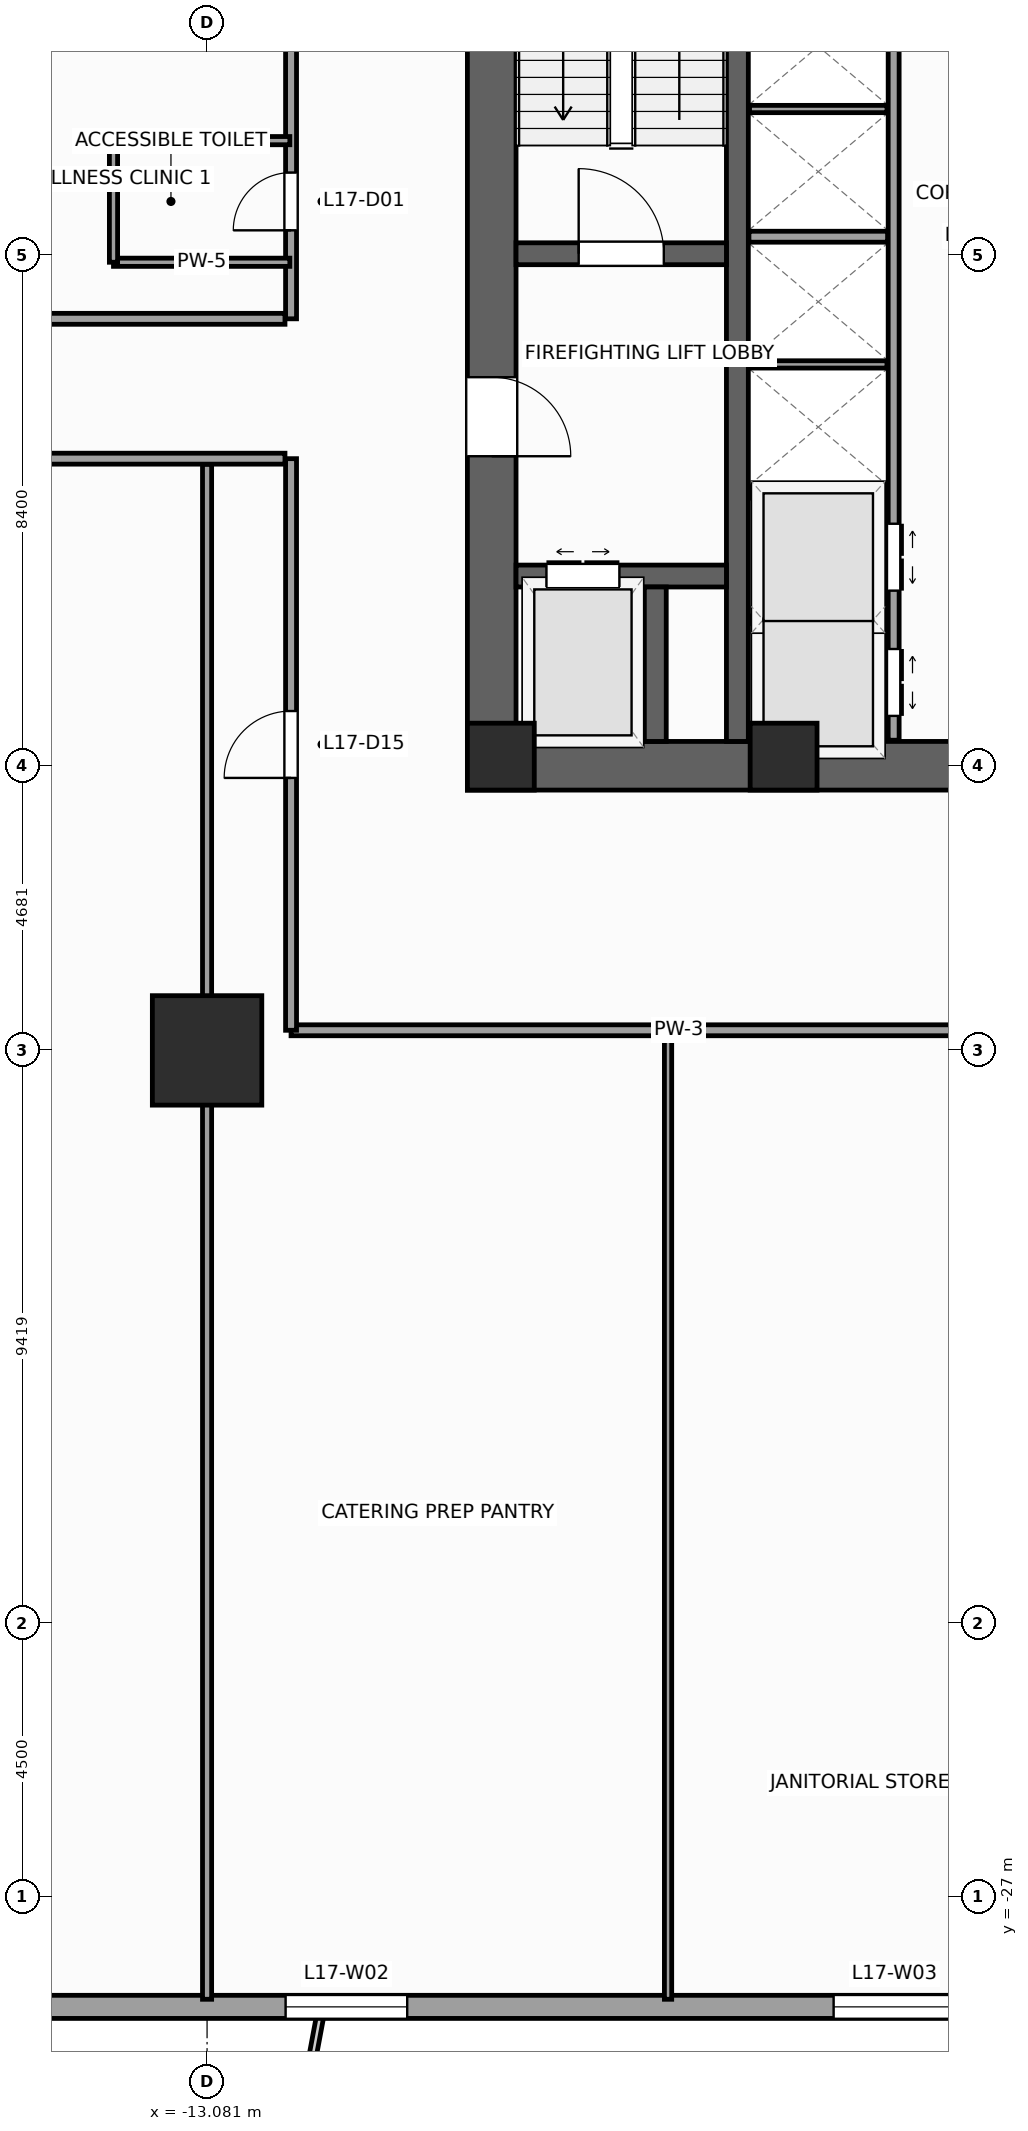
"""IFC4 building model, lengths in metres.
Left out: names, types, materials, properties, quantities, classifications, styles, units other than length and angle.
Written with IfcOpenShell. Run it as: python <this file> out.ifc"""

import sys

from ifc_helpers import new_model, si_unit, direction, frame, frame_2d, origin, origin_2d, place, context, subcontext, project, spatial, rectangle, extrude, source, transform, mapped, element, fill, save


model = new_model("IFC4")
c1 = context("Model", 3, precision=1e-05, world=origin(), true_north=direction((0.0, 1.0)))
c2 = subcontext(c1, "Body", "Model", "MODEL_VIEW")
j1 = project(units=[si_unit("LENGTHUNIT", "METRE"), si_unit("PLANEANGLEUNIT", "RADIAN")], contexts=[c1])
p1 = place(None, origin())
s1 = spatial("IfcSite", under=j1, at=p1, CompositionType="ELEMENT")
p2 = place(p1, origin())
s2 = spatial("IfcBuilding", under=s1, at=p2, CompositionType="ELEMENT")
p3 = place(p2, frame((0.0, 0.0, 74.0)))
s3 = spatial("IfcBuildingStorey", under=s2, at=p3, CompositionType="ELEMENT", Elevation=74.0)
p4 = place(p3, frame((-8.8, -8.4, 0.0), z_axis=(0.0, 0.0, 1.0), x_axis=(1.0, 0.0, 0.0)))
e1 = element("IfcWall", 1, at=p4, inside=s3, PredefinedType="SHEAR", context=c2, shape_type="SweptSolid", body=[
    extrude(rectangle(XDim=17.6, YDim=0.8, at=frame_2d((8.8, 0.0))), origin(), (0.0, 0.0, 1.0), 4.0),
])
p5 = place(p4, frame((8.15, 0.0, 0.0)))
e2 = element("IfcOpeningElement", 2, at=p5, cuts=e1, PredefinedType="OPENING", context=c2, shape_type="SweptSolid", body=[
    extrude(rectangle(XDim=1.3, YDim=2.2, at=frame_2d((0.65, 1.1))), frame((0.0, 0.41, 0.0), z_axis=(0.0, -1.0, 0.0), x_axis=(1.0, 0.0, 0.0)), (0.0, 0.0, 1.0), 0.82),
])
p6 = place(p3, frame((-8.4, -8.0, 0.0), z_axis=(0.0, 0.0, 1.0), x_axis=(0.0, 1.0, 0.0)))
e3 = element("IfcWall", 3, at=p6, inside=s3, PredefinedType="SHEAR", context=c2, shape_type="SweptSolid", body=[
    extrude(rectangle(XDim=16.0, YDim=0.8, at=frame_2d((8.0, 0.0))), origin(), (0.0, 0.0, 1.0), 4.0),
])
p7 = place(p6, frame((4.69, 0.0, 0.0)))
e4 = element("IfcOpeningElement", 4, at=p7, cuts=e3, PredefinedType="OPENING", context=c2, shape_type="SweptSolid", body=[
    extrude(rectangle(XDim=1.3, YDim=2.2, at=frame_2d((0.65, 1.1))), frame((0.0, 0.41, 0.0), z_axis=(0.0, -1.0, 0.0), x_axis=(1.0, 0.0, 0.0)), (0.0, 0.0, 1.0), 0.82),
])
p8 = place(p3, frame((-4.36, -8.0, 0.0), z_axis=(0.0, 0.0, 1.0), x_axis=(0.0, 1.0, 0.0)))
e5 = element("IfcWall", 5, at=p8, inside=s3, PredefinedType="SHEAR", context=c2, shape_type="SweptSolid", body=[
    extrude(rectangle(XDim=16.0, YDim=0.36, at=frame_2d((8.0, 0.0))), origin(), (0.0, 0.0, 1.0), 4.0),
])
p9 = place(p3, frame((-8.0, 0.02, 0.0), z_axis=(0.0, 0.0, 1.0), x_axis=(1.0, 0.0, 0.0)))
e6 = element("IfcWall", 6, at=p9, inside=s3, PredefinedType="SHEAR", context=c2, shape_type="SweptSolid", body=[
    extrude(rectangle(XDim=3.46, YDim=0.36, at=frame_2d((1.73, 0.0))), origin(), (0.0, 0.0, 1.0), 4.0),
])
p10 = place(p9, frame((1.03, 0.0, 0.0)))
e7 = element("IfcOpeningElement", 7, at=p10, cuts=e6, PredefinedType="OPENING", context=c2, shape_type="SweptSolid", body=[
    extrude(rectangle(XDim=1.4, YDim=2.2, at=frame_2d((0.7, 1.1))), frame((0.0, 0.19, 0.0), z_axis=(0.0, -1.0, 0.0), x_axis=(1.0, 0.0, 0.0)), (0.0, 0.0, 1.0), 0.38),
])
p11 = place(p3, frame((-8.0, -5.28, 0.0), z_axis=(0.0, 0.0, 1.0), x_axis=(1.0, 0.0, 0.0)))
e8 = element("IfcWall", 8, at=p11, inside=s3, PredefinedType="SHEAR", context=c2, shape_type="SweptSolid", body=[
    extrude(rectangle(XDim=3.46, YDim=0.36, at=frame_2d((1.73, 0.0))), origin(), (0.0, 0.0, 1.0), 4.0),
])
p12 = place(p11, frame((0.5, 0.0, 0.0)))
e9 = element("IfcOpeningElement", 9, at=p12, cuts=e8, PredefinedType="OPENING", context=c2, shape_type="SweptSolid", body=[
    extrude(rectangle(XDim=1.2, YDim=2.25, at=frame_2d((0.6, 1.125))), frame((0.0, 0.19, 0.0), z_axis=(0.0, -1.0, 0.0), x_axis=(1.0, 0.0, 0.0)), (0.0, 0.0, 1.0), 0.38),
])
p13 = place(p3, frame((-5.71, -8.0, 0.0), z_axis=(0.0, 0.0, 1.0), x_axis=(0.0, 1.0, 0.0)))
e10 = element("IfcWall", 10, at=p13, inside=s3, PredefinedType="SHEAR", context=c2, shape_type="SweptSolid", body=[
    extrude(rectangle(XDim=2.54, YDim=0.36, at=frame_2d((1.27, 0.0))), origin(), (0.0, 0.0, 1.0), 4.0),
])
m1 = source(origin(), c2, "Body", "SweptSolid", [
    extrude(rectangle(XDim=1.1, YDim=1.1, at=origin_2d()), origin(), (0.0, 0.0, 1.0), 4.0),
])
for number, where, z_axis, x_axis in (
    (11, (-8.25, -8.25, 0.0), (0.0, 0.0, 1.0), (1.0, 0.0, 0.0)),
    (12, (-3.6, -8.25, 0.0), (0.0, 0.0, 1.0), (1.0, 0.0, 0.0)),
):
    element("IfcColumn", number, at=place(p3, frame(where, z_axis=z_axis, x_axis=x_axis)), inside=s3, PredefinedType="PILASTER", context=c2, shape_type="MappedRepresentation", body=[
        mapped(m1, transform((0.0, 0.0, 0.0), scale=1.0)),
    ])
m2 = source(origin(), c2, "Body", "SweptSolid", [
    extrude(rectangle(XDim=1.8, YDim=1.8, at=origin_2d()), origin(), (0.0, 0.0, 1.0), 4.0),
])
p14 = place(p3, frame((-13.081, -13.081, 0.0), z_axis=(0.0, 0.0, 1.0), x_axis=(1.0, 0.0, 0.0)))
e13 = element("IfcColumn", 13, at=p14, inside=s3, PredefinedType="COLUMN", context=c2, shape_type="MappedRepresentation", body=[
    mapped(m2, transform((0.0, 0.0, 0.0), scale=1.0)),
])
p15 = place(p3, frame((-25.69, -28.81, 0.0), z_axis=(0.0, 0.0, 1.0), x_axis=(1.0, 0.0, 0.0)))
e14 = element("IfcWall", 14, at=p15, inside=s3, PredefinedType="STANDARD", context=c2, shape_type="SweptSolid", body=[
    extrude(rectangle(XDim=51.38, YDim=0.38, at=frame_2d((25.69, 0.0))), origin(), (0.0, 0.0, 1.0), 2.2),
])
p16 = place(p15, frame((31.615, 0.0, 0.0)))
e15 = element("IfcOpeningElement", 15, at=p16, cuts=e14, PredefinedType="OPENING", context=c2, shape_type="SweptSolid", body=[
    extrude(rectangle(XDim=1.05, YDim=2.02, at=frame_2d((0.525, 1.01))), frame((0.0, 0.2, 0.0), z_axis=(0.0, -1.0, 0.0), x_axis=(1.0, 0.0, 0.0)), (0.0, 0.0, 1.0), 0.4),
])
p17 = place(p15, frame((5.166, 0.0, 0.67)))
e16 = element("IfcOpeningElement", 16, at=p17, cuts=e14, PredefinedType="OPENING", context=c2, shape_type="SweptSolid", body=[
    extrude(rectangle(XDim=2.0, YDim=1.45, at=frame_2d((1.0, 0.725))), frame((0.0, 0.2, 0.0), z_axis=(0.0, -1.0, 0.0), x_axis=(1.0, 0.0, 0.0)), (0.0, 0.0, 1.0), 0.4),
])
p18 = place(p15, frame((13.9, 0.0, 0.67)))
e17 = element("IfcOpeningElement", 17, at=p18, cuts=e14, PredefinedType="OPENING", context=c2, shape_type="SweptSolid", body=[
    extrude(rectangle(XDim=2.0, YDim=1.45, at=frame_2d((1.0, 0.725))), frame((0.0, 0.2, 0.0), z_axis=(0.0, -1.0, 0.0), x_axis=(1.0, 0.0, 0.0)), (0.0, 0.0, 1.0), 0.4),
])
p19 = place(p15, frame((22.912, 0.0, 0.67)))
e18 = element("IfcOpeningElement", 18, at=p19, cuts=e14, PredefinedType="OPENING", context=c2, shape_type="SweptSolid", body=[
    extrude(rectangle(XDim=2.0, YDim=1.45, at=frame_2d((1.0, 0.725))), frame((0.0, 0.2, 0.0), z_axis=(0.0, -1.0, 0.0), x_axis=(1.0, 0.0, 0.0)), (0.0, 0.0, 1.0), 0.4),
])
p20 = place(p15, frame((35.438, 0.0, 0.67)))
e19 = element("IfcOpeningElement", 19, at=p20, cuts=e14, PredefinedType="OPENING", context=c2, shape_type="SweptSolid", body=[
    extrude(rectangle(XDim=2.0, YDim=1.45, at=frame_2d((1.0, 0.725))), frame((0.0, 0.2, 0.0), z_axis=(0.0, -1.0, 0.0), x_axis=(1.0, 0.0, 0.0)), (0.0, 0.0, 1.0), 0.4),
])
p21 = place(p15, frame((43.187, 0.0, 0.67)))
e20 = element("IfcOpeningElement", 20, at=p21, cuts=e14, PredefinedType="OPENING", context=c2, shape_type="SweptSolid", body=[
    extrude(rectangle(XDim=2.0, YDim=1.45, at=frame_2d((1.0, 0.725))), frame((0.0, 0.2, 0.0), z_axis=(0.0, -1.0, 0.0), x_axis=(1.0, 0.0, 0.0)), (0.0, 0.0, 1.0), 0.4),
])
p22 = place(p3, frame((-1.79, -7.98, 0.0), z_axis=(0.0, 0.0, 1.0), x_axis=(0.0, 1.0, 0.0)))
e21 = element("IfcWall", 21, at=p22, inside=s3, PredefinedType="PARTITIONING", context=c2, shape_type="SweptSolid", body=[
    extrude(rectangle(XDim=12.38, YDim=0.18, at=frame_2d((6.19, 0.0))), origin(), (0.0, 0.0, 1.0), 3.6),
])
p23 = place(p22, frame((0.4, 0.0, 0.0)))
e22 = element("IfcOpeningElement", 22, at=p23, cuts=e21, PredefinedType="OPENING", context=c2, shape_type="SweptSolid", body=[
    extrude(rectangle(XDim=1.1, YDim=2.2, at=frame_2d((0.55, 1.1))), frame((0.0, 0.1, 0.0), z_axis=(0.0, -1.0, 0.0), x_axis=(1.0, 0.0, 0.0)), (0.0, 0.0, 1.0), 0.2),
])
p24 = place(p22, frame((2.46, 0.0, 0.0)))
e23 = element("IfcOpeningElement", 23, at=p24, cuts=e21, PredefinedType="OPENING", context=c2, shape_type="SweptSolid", body=[
    extrude(rectangle(XDim=1.1, YDim=2.2, at=frame_2d((0.55, 1.1))), frame((0.0, 0.1, 0.0), z_axis=(0.0, -1.0, 0.0), x_axis=(1.0, 0.0, 0.0)), (0.0, 0.0, 1.0), 0.2),
])
for number, where, z_axis, x_axis in (
    (24, (-4.17, -3.9, 0.0), (0.0, 0.0, 1.0), (1.0, 0.0, 0.0)),
    (25, (-4.17, 0.3, 0.0), (0.0, 0.0, 1.0), (1.0, 0.0, 0.0)),
):
    element("IfcWall", number, at=place(p3, frame(where, z_axis=z_axis, x_axis=x_axis)), inside=s3, PredefinedType="PARTITIONING", context=c2, shape_type="SweptSolid", body=[
        extrude(rectangle(XDim=2.28, YDim=0.18, at=frame_2d((1.14, 0.0))), origin(), (0.0, 0.0, 1.0), 3.6),
    ])
for number, where, z_axis, x_axis in (
    (26, (-4.16, -6.0, 0.0), (0.0, 0.0, 1.0), (1.0, 0.0, 0.0)),
    (27, (-4.16, -1.8, 0.0), (0.0, 0.0, 1.0), (1.0, 0.0, 0.0)),
    (28, (-4.16, 2.4, 0.0), (0.0, 0.0, 1.0), (1.0, 0.0, 0.0)),
):
    element("IfcWall", number, at=place(p3, frame(where, z_axis=z_axis, x_axis=x_axis)), inside=s3, PredefinedType="PARTITIONING", context=c2, shape_type="SweptSolid", body=[
        extrude(rectangle(XDim=2.26, YDim=0.12, at=frame_2d((1.13, 0.0))), origin(), (0.0, 0.0, 1.0), 3.6),
    ])
p25 = place(p3, frame((-11.7, -12.75, 0.0), z_axis=(0.0, 0.0, 1.0), x_axis=(1.0, 0.0, 0.0)))
e29 = element("IfcWall", 29, at=p25, inside=s3, PredefinedType="PARTITIONING", context=c2, shape_type="SweptSolid", body=[
    extrude(rectangle(XDim=12.75, YDim=0.18, at=frame_2d((6.375, 0.0))), origin(), (0.0, 0.0, 1.0), 2.56),
])
p26 = place(p3, frame((-11.7, -12.75, 0.0), z_axis=(0.0, 0.0, 1.0), x_axis=(0.0, 1.0, 0.0)))
e30 = element("IfcWall", 30, at=p26, inside=s3, PredefinedType="PARTITIONING", context=c2, shape_type="SweptSolid", body=[
    extrude(rectangle(XDim=9.4, YDim=0.18, at=frame_2d((4.7, 0.0))), origin(), (0.0, 0.0, 1.0), 3.6),
])
p27 = place(p26, frame((4.15, 0.0, 0.0)))
e31 = element("IfcOpeningElement", 31, at=p27, cuts=e30, PredefinedType="OPENING", context=c2, shape_type="SweptSolid", body=[
    extrude(rectangle(XDim=1.1, YDim=2.2, at=frame_2d((0.55, 1.1))), frame((0.0, 0.1, 0.0), z_axis=(0.0, -1.0, 0.0), x_axis=(1.0, 0.0, 0.0)), (0.0, 0.0, 1.0), 0.2),
])
p28 = place(p3, frame((-11.7, -1.05, 0.0), z_axis=(0.0, 0.0, 1.0), x_axis=(0.0, 1.0, 0.0)))
e32 = element("IfcWall", 32, at=p28, inside=s3, PredefinedType="PARTITIONING", context=c2, shape_type="SweptSolid", body=[
    extrude(rectangle(XDim=11.65, YDim=0.18, at=frame_2d((5.825, 0.0))), origin(), (0.0, 0.0, 1.0), 3.6),
])
p29 = place(p28, frame((1.455, 0.0, 0.0)))
e33 = element("IfcOpeningElement", 33, at=p29, cuts=e32, PredefinedType="OPENING", context=c2, shape_type="SweptSolid", body=[
    extrude(rectangle(XDim=0.95, YDim=2.1, at=frame_2d((0.475, 1.05))), frame((0.0, 0.1, 0.0), z_axis=(0.0, -1.0, 0.0), x_axis=(1.0, 0.0, 0.0)), (0.0, 0.0, 1.0), 0.2),
])
p30 = place(p28, frame((6.462, 0.0, 0.0)))
e34 = element("IfcOpeningElement", 34, at=p30, cuts=e32, PredefinedType="OPENING", context=c2, shape_type="SweptSolid", body=[
    extrude(rectangle(XDim=1.1, YDim=2.2, at=frame_2d((0.55, 1.1))), frame((0.0, 0.1, 0.0), z_axis=(0.0, -1.0, 0.0), x_axis=(1.0, 0.0, 0.0)), (0.0, 0.0, 1.0), 0.2),
])
p31 = place(p3, frame((-28.685, -3.35, 0.0), z_axis=(0.0, 0.0, 1.0), x_axis=(1.0, 0.0, 0.0)))
e35 = element("IfcWall", 35, at=p31, inside=s3, PredefinedType="PARTITIONING", context=c2, shape_type="SweptSolid", body=[
    extrude(rectangle(XDim=16.885, YDim=0.18, at=frame_2d((8.442, 0.0))), origin(), (0.0, 0.0, 1.0), 3.6),
])
p32 = place(p31, frame((7.417, 0.0, 0.0)))
e36 = element("IfcOpeningElement", 36, at=p32, cuts=e35, PredefinedType="OPENING", context=c2, shape_type="SweptSolid", body=[
    extrude(rectangle(XDim=1.1, YDim=2.2, at=frame_2d((0.55, 1.1))), frame((0.0, 0.1, 0.0), z_axis=(0.0, -1.0, 0.0), x_axis=(1.0, 0.0, 0.0)), (0.0, 0.0, 1.0), 0.2),
])
p33 = place(p3, frame((-28.685, -1.05, 0.0), z_axis=(0.0, 0.0, 1.0), x_axis=(1.0, 0.0, 0.0)))
e37 = element("IfcWall", 37, at=p33, inside=s3, PredefinedType="PARTITIONING", context=c2, shape_type="SweptSolid", body=[
    extrude(rectangle(XDim=16.885, YDim=0.18, at=frame_2d((8.442, 0.0))), origin(), (0.0, 0.0, 1.0), 3.6),
])
p34 = place(p33, frame((7.968, 0.0, 0.0)))
e38 = element("IfcOpeningElement", 38, at=p34, cuts=e37, PredefinedType="OPENING", context=c2, shape_type="SweptSolid", body=[
    extrude(rectangle(XDim=0.95, YDim=2.1, at=frame_2d((0.475, 1.05))), frame((0.0, 0.1, 0.0), z_axis=(0.0, -1.0, 0.0), x_axis=(1.0, 0.0, 0.0)), (0.0, 0.0, 1.0), 0.2),
])
p35 = place(p33, frame((3.279, 0.0, 0.0)))
e39 = element("IfcOpeningElement", 39, at=p35, cuts=e37, PredefinedType="OPENING", context=c2, shape_type="SweptSolid", body=[
    extrude(rectangle(XDim=1.1, YDim=2.2, at=frame_2d((0.55, 1.1))), frame((0.0, 0.1, 0.0), z_axis=(0.0, -1.0, 0.0), x_axis=(1.0, 0.0, 0.0)), (0.0, 0.0, 1.0), 0.2),
])
p36 = place(p3, frame((-13.081, -28.685, 0.0), z_axis=(0.0, 0.0, 1.0), x_axis=(0.0, 1.0, 0.0)))
e40 = element("IfcWall", 40, at=p36, inside=s3, PredefinedType="PARTITIONING", context=c2, shape_type="SweptSolid", body=[
    extrude(rectangle(XDim=25.24, YDim=0.15, at=frame_2d((12.62, 0.0))), origin(), (0.0, 0.0, 1.0), 2.2),
])
p37 = place(p3, frame((-5.5, -28.685, 0.0), z_axis=(0.0, 0.0, 1.0), x_axis=(0.0, 1.0, 0.0)))
e41 = element("IfcWall", 41, at=p37, inside=s3, PredefinedType="PARTITIONING", context=c2, shape_type="SweptSolid", body=[
    extrude(rectangle(XDim=15.84, YDim=0.12, at=frame_2d((7.92, 0.0))), origin(), (0.0, 0.0, 1.0), 3.27),
])
for number, where, z_axis, x_axis in (
    (42, (-14.62, -0.12, 0.0), (0.0, 0.0, 1.0), (1.0, 0.0, 0.0)),
    (43, (-14.62, 1.88, 0.0), (0.0, 0.0, 1.0), (1.0, 0.0, 0.0)),
):
    element("IfcWall", number, at=place(p3, frame(where, z_axis=z_axis, x_axis=x_axis)), inside=s3, PredefinedType="PARTITIONING", context=c2, shape_type="SweptSolid", body=[
        extrude(rectangle(XDim=2.9, YDim=0.135, at=frame_2d((1.45, 0.0))), origin(), (0.0, 0.0, 1.0), 3.6),
    ])
p38 = place(p3, frame((-14.62, -0.12, 0.0), z_axis=(0.0, 0.0, 1.0), x_axis=(0.0, 1.0, 0.0)))
e44 = element("IfcWall", 44, at=p38, inside=s3, PredefinedType="PARTITIONING", context=c2, shape_type="SweptSolid", body=[
    extrude(rectangle(XDim=2.0, YDim=0.135, at=frame_2d((1.0, 0.0))), origin(), (0.0, 0.0, 1.0), 3.6),
])
m3 = source(origin(), c2, "Body", "SweptSolid", [
    extrude(rectangle(XDim=2.0, YDim=1.45, at=frame_2d((1.0, 0.725))), frame((0.0, 0.03, 0.0), z_axis=(0.0, -1.0, 0.0), x_axis=(1.0, 0.0, 0.0)), (0.0, 0.0, 1.0), 0.06),
])
p39 = place(p18, origin())
e45 = element("IfcWindow", 45, at=p39, inside=s3, PartitioningType="SINGLE_PANEL", PredefinedType="WINDOW", context=c2, shape_type="MappedRepresentation", body=[
    mapped(m3, transform((0.0, 0.0, 0.0), scale=1.0)),
])
fill(e17, e45)
p40 = place(p19, origin())
e46 = element("IfcWindow", 46, at=p40, inside=s3, PartitioningType="SINGLE_PANEL", PredefinedType="WINDOW", context=c2, shape_type="MappedRepresentation", body=[
    mapped(m3, transform((0.0, 0.0, 0.0), scale=1.0)),
])
fill(e18, e46)
m4 = source(origin(), c2, "Body", "SweptSolid", [
    extrude(rectangle(XDim=1.4, YDim=2.2, at=frame_2d((0.7, 1.1))), frame((0.0, 0.025, 0.0), z_axis=(0.0, -1.0, 0.0), x_axis=(1.0, 0.0, 0.0)), (0.0, 0.0, 1.0), 0.05),
])
p41 = place(p10, origin())
e47 = element("IfcDoor", 47, at=p41, inside=s3, OperationType="SINGLE_SWING_LEFT", PredefinedType="DOOR", context=c2, shape_type="MappedRepresentation", body=[
    mapped(m4, transform((0.0, 0.0, 0.0), scale=1.0)),
])
fill(e7, e47)
m5 = source(origin(), c2, "Body", "SweptSolid", [
    extrude(rectangle(XDim=1.3, YDim=2.2, at=frame_2d((0.65, 1.1))), frame((0.0, 0.025, 0.0), z_axis=(0.0, -1.0, 0.0), x_axis=(1.0, 0.0, 0.0)), (0.0, 0.0, 1.0), 0.05),
])
p42 = place(p7, frame((1.3, 0.0, 0.0), z_axis=(0.0, 0.0, 1.0), x_axis=(-1.0, 0.0, 0.0)))
e48 = element("IfcDoor", 48, at=p42, inside=s3, OperationType="SINGLE_SWING_LEFT", PredefinedType="DOOR", context=c2, shape_type="MappedRepresentation", body=[
    mapped(m5, transform((0.0, 0.0, 0.0), scale=1.0)),
])
fill(e4, e48)
m6 = source(origin(), c2, "Body", "SweptSolid", [
    extrude(rectangle(XDim=1.2, YDim=2.25, at=frame_2d((0.6, 1.125))), frame((0.0, 0.025, 0.0), z_axis=(0.0, -1.0, 0.0), x_axis=(1.0, 0.0, 0.0)), (0.0, 0.0, 1.0), 0.05),
])
p43 = place(p12, origin())
e49 = element("IfcDoor", 49, at=p43, inside=s3, OperationType="DOUBLE_DOOR_SLIDING", PredefinedType="DOOR", context=c2, shape_type="MappedRepresentation", body=[
    mapped(m6, transform((0.0, 0.0, 0.0), scale=1.0)),
])
fill(e9, e49)
m7 = source(origin(), c2, "Body", "SweptSolid", [
    extrude(rectangle(XDim=1.1, YDim=2.2, at=frame_2d((0.55, 1.1))), frame((0.0, 0.025, 0.0), z_axis=(0.0, -1.0, 0.0), x_axis=(1.0, 0.0, 0.0)), (0.0, 0.0, 1.0), 0.05),
])
p44 = place(p23, frame((1.1, 0.0, 0.0), z_axis=(0.0, 0.0, 1.0), x_axis=(-1.0, 0.0, 0.0)))
e50 = element("IfcDoor", 50, at=p44, inside=s3, OperationType="DOUBLE_DOOR_SLIDING", PredefinedType="DOOR", context=c2, shape_type="MappedRepresentation", body=[
    mapped(m7, transform((0.0, 0.0, 0.0), scale=1.0)),
])
fill(e22, e50)
p45 = place(p24, frame((1.1, 0.0, 0.0), z_axis=(0.0, 0.0, 1.0), x_axis=(-1.0, 0.0, 0.0)))
e51 = element("IfcDoor", 51, at=p45, inside=s3, OperationType="DOUBLE_DOOR_SLIDING", PredefinedType="DOOR", context=c2, shape_type="MappedRepresentation", body=[
    mapped(m7, transform((0.0, 0.0, 0.0), scale=1.0)),
])
fill(e23, e51)
m8 = source(origin(), c2, "Body", "SweptSolid", [
    extrude(rectangle(XDim=0.95, YDim=2.1, at=frame_2d((0.475, 1.05))), frame((0.0, 0.025, 0.0), z_axis=(0.0, -1.0, 0.0), x_axis=(1.0, 0.0, 0.0)), (0.0, 0.0, 1.0), 0.05),
])
p46 = place(p29, origin())
e52 = element("IfcDoor", 52, at=p46, inside=s3, OperationType="SINGLE_SWING_LEFT", PredefinedType="DOOR", context=c2, shape_type="MappedRepresentation", body=[
    mapped(m8, transform((0.0, 0.0, 0.0), scale=1.0)),
])
fill(e33, e52)
p47 = place(p27, origin())
e53 = element("IfcDoor", 53, at=p47, inside=s3, OperationType="SINGLE_SWING_LEFT", PredefinedType="DOOR", context=c2, shape_type="MappedRepresentation", body=[
    mapped(m7, transform((0.0, 0.0, 0.0), scale=1.0)),
])
fill(e31, e53)
save(model, sys.argv[1])
